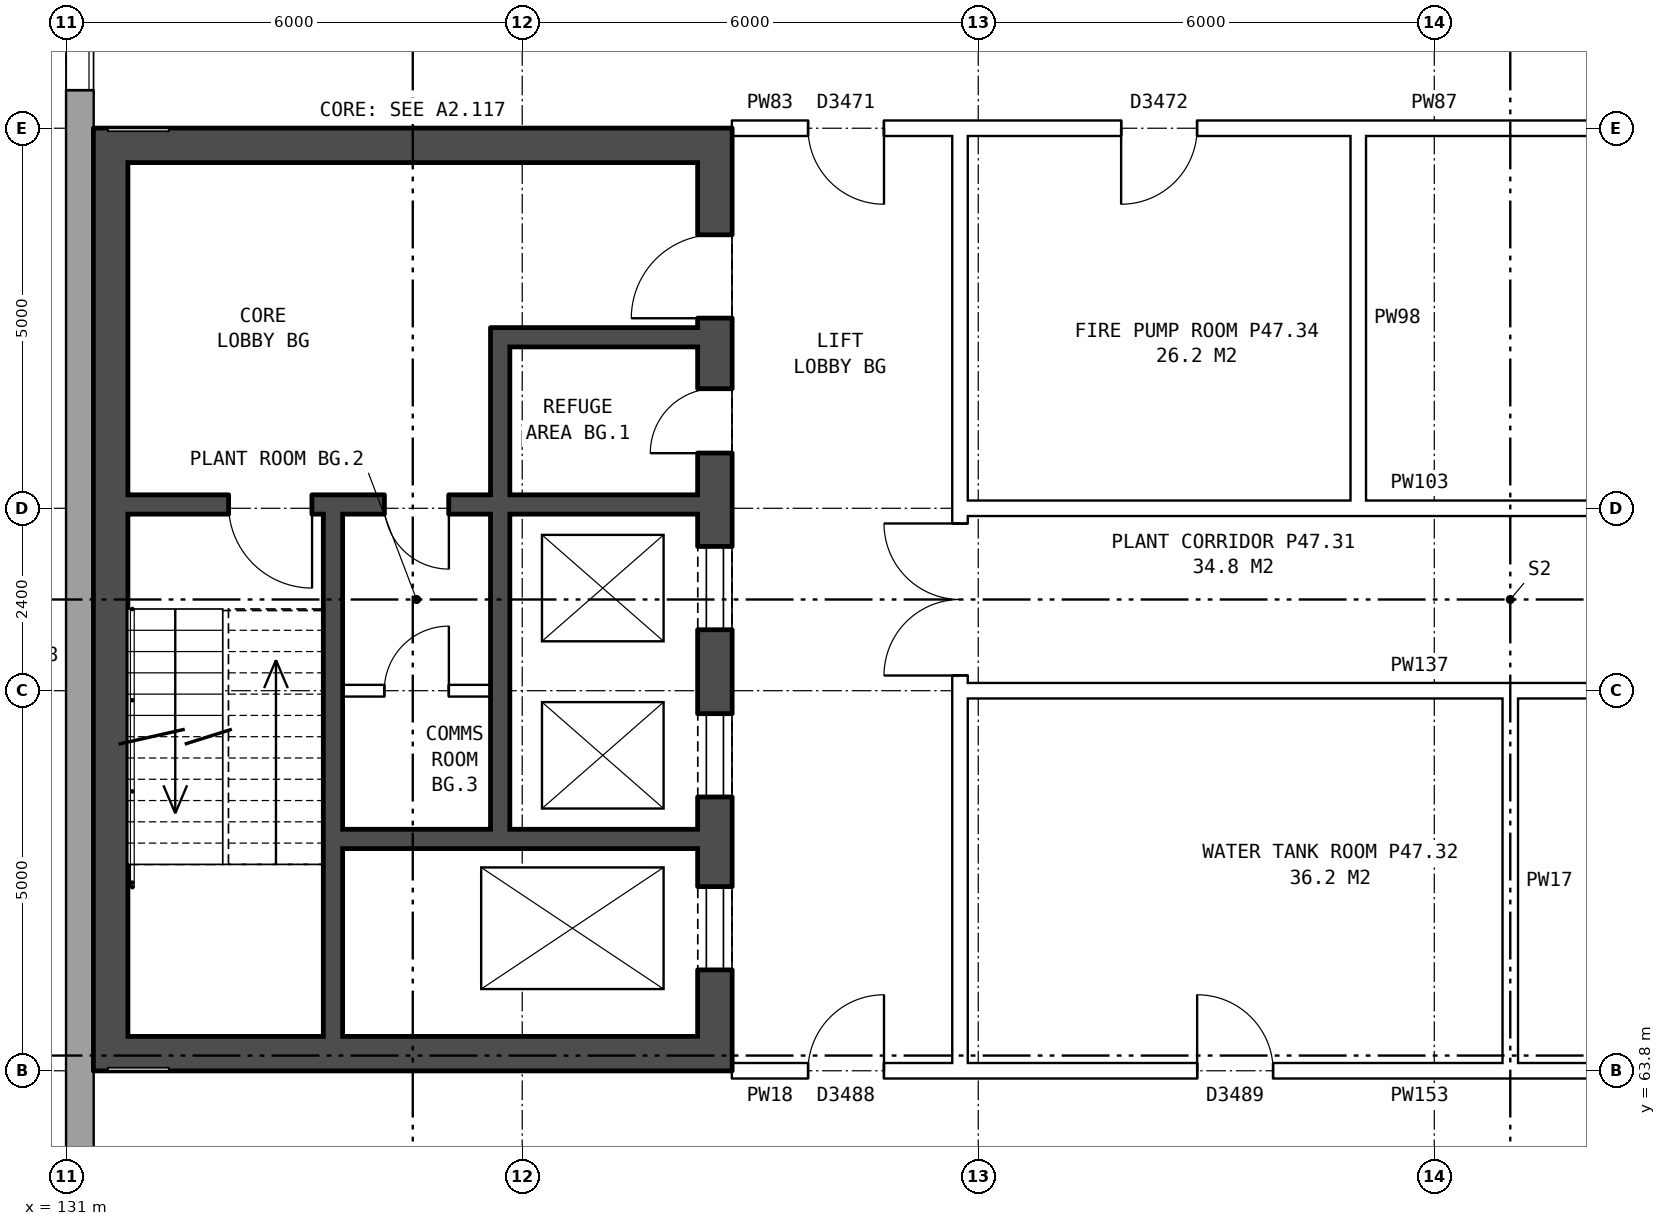
"""IFC4 building model, lengths in metres.
Left out: names, types, materials, properties, quantities, classifications, styles, units other than length and angle.
Written with IfcOpenShell. Run it as: python <this file> out.ifc"""

import sys

from ifc_helpers import new_model, si_unit, direction, frame, frame_2d, origin, place, context, subcontext, project, spatial, rectangle, extrude, element, fill, save


model = new_model("IFC4")
c1 = context("Model", 3, precision=1e-05, world=origin(), true_north=direction((0.0, 1.0)))
c2 = subcontext(c1, "Body", "Model", "MODEL_VIEW")
j1 = project(units=[si_unit("LENGTHUNIT", "METRE"), si_unit("PLANEANGLEUNIT", "RADIAN")], contexts=[c1])
p1 = place(None, origin())
s1 = spatial("IfcSite", under=j1, at=p1, CompositionType="ELEMENT")
p2 = place(p1, origin())
s2 = spatial("IfcBuilding", under=s1, at=p2, CompositionType="ELEMENT")
p3 = place(p2, frame((0.0, 0.0, 167.1)))
s3 = spatial("IfcBuildingStorey", under=s2, at=p3, CompositionType="ELEMENT", Elevation=167.1)
p4 = place(p3, frame((131.18, 82.925, 0.0), z_axis=(0.0, 0.0, 1.0), x_axis=(0.0, -1.0, 0.0)))
e1 = element("IfcWall", 1, at=p4, inside=s3, PredefinedType="STANDARD", context=c2, shape_type="SweptSolid", body=[
    extrude(rectangle(XDim=25.851, YDim=0.36, at=frame_2d((12.925, 0.0))), origin(), (0.0, 0.0, 1.0), 4.2),
])
p5 = place(p4, frame((2.9, 0.0, 1.5)))
e2 = element("IfcOpeningElement", 2, at=p5, cuts=e1, PredefinedType="OPENING", context=c2, shape_type="SweptSolid", body=[
    extrude(rectangle(XDim=0.6, YDim=1.2, at=frame_2d((0.3, 0.6))), frame((0.0, 0.19, 0.0), z_axis=(0.0, -1.0, 0.0), x_axis=(1.0, 0.0, 0.0)), (0.0, 0.0, 1.0), 0.38),
])
p6 = place(p4, frame((4.625, 0.0, 1.5)))
e3 = element("IfcOpeningElement", 3, at=p6, cuts=e1, PredefinedType="OPENING", context=c2, shape_type="SweptSolid", body=[
    extrude(rectangle(XDim=1.6, YDim=1.2, at=frame_2d((0.8, 0.6))), frame((0.0, 0.19, 0.0), z_axis=(0.0, -1.0, 0.0), x_axis=(1.0, 0.0, 0.0)), (0.0, 0.0, 1.0), 0.38),
])
p7 = place(p4, frame((21.1, 0.0, 1.5)))
e4 = element("IfcOpeningElement", 4, at=p7, cuts=e1, PredefinedType="OPENING", context=c2, shape_type="SweptSolid", body=[
    extrude(rectangle(XDim=0.6, YDim=1.2, at=frame_2d((0.3, 0.6))), frame((0.0, 0.19, 0.0), z_axis=(0.0, -1.0, 0.0), x_axis=(1.0, 0.0, 0.0)), (0.0, 0.0, 1.0), 0.38),
])
p8 = place(p4, frame((22.325, 0.0, 1.5)))
e5 = element("IfcOpeningElement", 5, at=p8, cuts=e1, PredefinedType="OPENING", context=c2, shape_type="SweptSolid", body=[
    extrude(rectangle(XDim=0.6, YDim=1.2, at=frame_2d((0.3, 0.6))), frame((0.0, 0.19, 0.0), z_axis=(0.0, -1.0, 0.0), x_axis=(1.0, 0.0, 0.0)), (0.0, 0.0, 1.0), 0.38),
])
p9 = place(p3, frame((139.535, 63.8, 0.0), z_axis=(0.0, 0.0, 1.0), x_axis=(0.0, 1.0, 0.0)))
e6 = element("IfcWall", 6, at=p9, inside=s3, PredefinedType="SHEAR", context=c2, shape_type="SweptSolid", body=[
    extrude(rectangle(XDim=12.4, YDim=0.45, at=frame_2d((6.2, 0.0))), origin(), (0.0, 0.0, 1.0), 4.2),
])
p10 = place(p9, frame((1.325, 0.0, 0.0)))
e7 = element("IfcOpeningElement", 7, at=p10, cuts=e6, PredefinedType="OPENING", context=c2, shape_type="SweptSolid", body=[
    extrude(rectangle(XDim=1.1, YDim=2.1, at=frame_2d((0.55, 1.05))), frame((0.0, 0.235, 0.0), z_axis=(0.0, -1.0, 0.0), x_axis=(1.0, 0.0, 0.0)), (0.0, 0.0, 1.0), 0.47),
])
p11 = place(p9, frame((3.6, 0.0, 0.0)))
e8 = element("IfcOpeningElement", 8, at=p11, cuts=e6, PredefinedType="OPENING", context=c2, shape_type="SweptSolid", body=[
    extrude(rectangle(XDim=1.1, YDim=2.1, at=frame_2d((0.55, 1.05))), frame((0.0, 0.235, 0.0), z_axis=(0.0, -1.0, 0.0), x_axis=(1.0, 0.0, 0.0)), (0.0, 0.0, 1.0), 0.47),
])
p12 = place(p9, frame((5.8, 0.0, 0.0)))
e9 = element("IfcOpeningElement", 9, at=p12, cuts=e6, PredefinedType="OPENING", context=c2, shape_type="SweptSolid", body=[
    extrude(rectangle(XDim=1.1, YDim=2.1, at=frame_2d((0.55, 1.05))), frame((0.0, 0.235, 0.0), z_axis=(0.0, -1.0, 0.0), x_axis=(1.0, 0.0, 0.0)), (0.0, 0.0, 1.0), 0.47),
])
p13 = place(p9, frame((9.9, 0.0, 0.0)))
e10 = element("IfcOpeningElement", 10, at=p13, cuts=e6, PredefinedType="OPENING", context=c2, shape_type="SweptSolid", body=[
    extrude(rectangle(XDim=1.1, YDim=2.1, at=frame_2d((0.55, 1.05))), frame((0.0, 0.235, 0.0), z_axis=(0.0, -1.0, 0.0), x_axis=(1.0, 0.0, 0.0)), (0.0, 0.0, 1.0), 0.47),
])
p14 = place(p9, frame((8.125, 0.0, 0.0)))
e11 = element("IfcOpeningElement", 11, at=p14, cuts=e6, PredefinedType="OPENING", context=c2, shape_type="SweptSolid", body=[
    extrude(rectangle(XDim=0.85, YDim=2.1, at=frame_2d((0.425, 1.05))), frame((0.0, 0.235, 0.0), z_axis=(0.0, -1.0, 0.0), x_axis=(1.0, 0.0, 0.0)), (0.0, 0.0, 1.0), 0.47),
])
p15 = place(p3, frame((131.585, 63.8, 0.0), z_axis=(0.0, 0.0, 1.0), x_axis=(0.0, 1.0, 0.0)))
e12 = element("IfcWall", 12, at=p15, inside=s3, PredefinedType="SHEAR", context=c2, shape_type="SweptSolid", body=[
    extrude(rectangle(XDim=12.4, YDim=0.45, at=frame_2d((6.2, 0.0))), origin(), (0.0, 0.0, 1.0), 4.2),
])
for number, where, z_axis, x_axis in (
    (13, (139.31, 64.025, 0.0), (0.0, 0.0, 1.0), (-1.0, 0.0, 0.0)),
    (14, (139.31, 75.975, 0.0), (0.0, 0.0, 1.0), (-1.0, 0.0, 0.0)),
):
    element("IfcWall", number, at=place(p3, frame(where, z_axis=z_axis, x_axis=x_axis)), inside=s3, PredefinedType="SHEAR", context=c2, shape_type="SweptSolid", body=[
        extrude(rectangle(XDim=7.5, YDim=0.45, at=frame_2d((3.75, 0.0))), origin(), (0.0, 0.0, 1.0), 4.2),
    ])
p16 = place(p3, frame((139.31, 66.85, 0.0), z_axis=(0.0, 0.0, 1.0), x_axis=(-1.0, 0.0, 0.0)))
e15 = element("IfcWall", 15, at=p16, inside=s3, PredefinedType="SHEAR", context=c2, shape_type="SweptSolid", body=[
    extrude(rectangle(XDim=4.675, YDim=0.25, at=frame_2d((2.337, 0.0))), origin(), (0.0, 0.0, 1.0), 4.2),
])
p17 = place(p3, frame((136.585, 68.8, 0.0), z_axis=(0.0, 0.0, 1.0), x_axis=(-1.0, 0.0, 0.0)))
e16 = element("IfcWall", 16, at=p17, inside=s3, PredefinedType="PARTITIONING", context=c2, shape_type="SweptSolid", body=[
    extrude(rectangle(XDim=1.95, YDim=0.15, at=frame_2d((0.975, 0.0))), origin(), (0.0, 0.0, 1.0), 4.2),
])
p18 = place(p17, frame((0.55, 0.0, 0.0)))
e17 = element("IfcOpeningElement", 17, at=p18, cuts=e16, PredefinedType="OPENING", context=c2, shape_type="SweptSolid", body=[
    extrude(rectangle(XDim=0.85, YDim=2.1, at=frame_2d((0.425, 1.05))), frame((0.0, 0.085, 0.0), z_axis=(0.0, -1.0, 0.0), x_axis=(1.0, 0.0, 0.0)), (0.0, 0.0, 1.0), 0.17),
])
p19 = place(p3, frame((139.31, 71.25, 0.0), z_axis=(0.0, 0.0, 1.0), x_axis=(-1.0, 0.0, 0.0)))
e18 = element("IfcWall", 18, at=p19, inside=s3, PredefinedType="SHEAR", context=c2, shape_type="SweptSolid", body=[
    extrude(rectangle(XDim=7.5, YDim=0.25, at=frame_2d((3.75, 0.0))), origin(), (0.0, 0.0, 1.0), 4.2),
])
p20 = place(p19, frame((5.075, 0.0, 0.0)))
e19 = element("IfcOpeningElement", 19, at=p20, cuts=e18, PredefinedType="OPENING", context=c2, shape_type="SweptSolid", body=[
    extrude(rectangle(XDim=1.1, YDim=2.1, at=frame_2d((0.55, 1.05))), frame((0.0, 0.135, 0.0), z_axis=(0.0, -1.0, 0.0), x_axis=(1.0, 0.0, 0.0)), (0.0, 0.0, 1.0), 0.27),
])
p21 = place(p19, frame((3.275, 0.0, 0.0)))
e20 = element("IfcOpeningElement", 20, at=p21, cuts=e18, PredefinedType="OPENING", context=c2, shape_type="SweptSolid", body=[
    extrude(rectangle(XDim=0.85, YDim=2.1, at=frame_2d((0.425, 1.05))), frame((0.0, 0.135, 0.0), z_axis=(0.0, -1.0, 0.0), x_axis=(1.0, 0.0, 0.0)), (0.0, 0.0, 1.0), 0.27),
])
p22 = place(p3, frame((139.31, 73.45, 0.0), z_axis=(0.0, 0.0, 1.0), x_axis=(-1.0, 0.0, 0.0)))
e21 = element("IfcWall", 21, at=p22, inside=s3, PredefinedType="SHEAR", context=c2, shape_type="SweptSolid", body=[
    extrude(rectangle(XDim=2.475, YDim=0.25, at=frame_2d((1.238, 0.0))), origin(), (0.0, 0.0, 1.0), 4.2),
])
p23 = place(p3, frame((136.71, 66.975, 0.0), z_axis=(0.0, 0.0, 1.0), x_axis=(0.0, 1.0, 0.0)))
e22 = element("IfcWall", 22, at=p23, inside=s3, PredefinedType="SHEAR", context=c2, shape_type="SweptSolid", body=[
    extrude(rectangle(XDim=4.15, YDim=0.25, at=frame_2d((2.075, 0.0))), origin(), (0.0, 0.0, 1.0), 4.2),
])
p24 = place(p3, frame((136.71, 71.375, 0.0), z_axis=(0.0, 0.0, 1.0), x_axis=(0.0, 1.0, 0.0)))
e23 = element("IfcWall", 23, at=p24, inside=s3, PredefinedType="SHEAR", context=c2, shape_type="SweptSolid", body=[
    extrude(rectangle(XDim=2.2, YDim=0.25, at=frame_2d((1.1, 0.0))), origin(), (0.0, 0.0, 1.0), 4.2),
])
p25 = place(p3, frame((134.51, 64.25, 0.0), z_axis=(0.0, 0.0, 1.0), x_axis=(0.0, 1.0, 0.0)))
e24 = element("IfcWall", 24, at=p25, inside=s3, PredefinedType="SHEAR", context=c2, shape_type="SweptSolid", body=[
    extrude(rectangle(XDim=6.875, YDim=0.25, at=frame_2d((3.438, 0.0))), origin(), (0.0, 0.0, 1.0), 4.2),
])
p26 = place(p3, frame((142.76, 63.9, 0.0), z_axis=(0.0, 0.0, 1.0), x_axis=(0.0, 1.0, 0.0)))
e25 = element("IfcWall", 25, at=p26, inside=s3, PredefinedType="PARTITIONING", context=c2, shape_type="SweptSolid", body=[
    extrude(rectangle(XDim=12.2, YDim=0.2, at=frame_2d((6.1, 0.0))), origin(), (0.0, 0.0, 1.0), 4.2),
])
p27 = place(p26, frame((5.1, 0.0, 0.0)))
e26 = element("IfcOpeningElement", 26, at=p27, cuts=e25, PredefinedType="OPENING", context=c2, shape_type="SweptSolid", body=[
    extrude(rectangle(XDim=2.0, YDim=2.1, at=frame_2d((1.0, 1.05))), frame((0.0, 0.11, 0.0), z_axis=(0.0, -1.0, 0.0), x_axis=(1.0, 0.0, 0.0)), (0.0, 0.0, 1.0), 0.22),
])
p28 = place(p3, frame((142.76, 63.8, 0.0), z_axis=(0.0, 0.0, 1.0), x_axis=(1.0, 0.0, 0.0)))
e27 = element("IfcWall", 27, at=p28, inside=s3, PredefinedType="PARTITIONING", context=c2, shape_type="SweptSolid", body=[
    extrude(rectangle(XDim=14.48, YDim=0.2, at=frame_2d((7.24, 0.0))), origin(), (0.0, 0.0, 1.0), 4.2),
])
p29 = place(p28, frame((3.12, 0.0, 0.0)))
e28 = element("IfcOpeningElement", 28, at=p29, cuts=e27, PredefinedType="OPENING", context=c2, shape_type="SweptSolid", body=[
    extrude(rectangle(XDim=1.0, YDim=2.1, at=frame_2d((0.5, 1.05))), frame((0.0, 0.11, 0.0), z_axis=(0.0, -1.0, 0.0), x_axis=(1.0, 0.0, 0.0)), (0.0, 0.0, 1.0), 0.22),
])
p30 = place(p28, frame((10.36, 0.0, 0.0)))
e29 = element("IfcOpeningElement", 29, at=p30, cuts=e27, PredefinedType="OPENING", context=c2, shape_type="SweptSolid", body=[
    extrude(rectangle(XDim=1.0, YDim=2.1, at=frame_2d((0.5, 1.05))), frame((0.0, 0.11, 0.0), z_axis=(0.0, -1.0, 0.0), x_axis=(1.0, 0.0, 0.0)), (0.0, 0.0, 1.0), 0.22),
])
p31 = place(p3, frame((139.76, 63.8, 0.0), z_axis=(0.0, 0.0, 1.0), x_axis=(1.0, 0.0, 0.0)))
e30 = element("IfcWall", 30, at=p31, inside=s3, PredefinedType="PARTITIONING", context=c2, shape_type="SweptSolid", body=[
    extrude(rectangle(XDim=3.0, YDim=0.2, at=frame_2d((1.5, 0.0))), origin(), (0.0, 0.0, 1.0), 4.2),
])
p32 = place(p31, frame((1.0, 0.0, 0.0)))
e31 = element("IfcOpeningElement", 31, at=p32, cuts=e30, PredefinedType="OPENING", context=c2, shape_type="SweptSolid", body=[
    extrude(rectangle(XDim=1.0, YDim=2.1, at=frame_2d((0.5, 1.05))), frame((0.0, 0.11, 0.0), z_axis=(0.0, -1.0, 0.0), x_axis=(1.0, 0.0, 0.0)), (0.0, 0.0, 1.0), 0.22),
])
for number, where, z_axis, x_axis in (
    (32, (142.76, 68.8, 0.0), (0.0, 0.0, 1.0), (1.0, 0.0, 0.0)),
    (33, (142.76, 71.2, 0.0), (0.0, 0.0, 1.0), (1.0, 0.0, 0.0)),
):
    element("IfcWall", number, at=place(p3, frame(where, z_axis=z_axis, x_axis=x_axis)), inside=s3, PredefinedType="PARTITIONING", context=c2, shape_type="SweptSolid", body=[
        extrude(rectangle(XDim=14.48, YDim=0.2, at=frame_2d((7.24, 0.0))), origin(), (0.0, 0.0, 1.0), 4.2),
    ])
p33 = place(p3, frame((142.76, 76.2, 0.0), z_axis=(0.0, 0.0, 1.0), x_axis=(1.0, 0.0, 0.0)))
e34 = element("IfcWall", 34, at=p33, inside=s3, PredefinedType="PARTITIONING", context=c2, shape_type="SweptSolid", body=[
    extrude(rectangle(XDim=14.48, YDim=0.2, at=frame_2d((7.24, 0.0))), origin(), (0.0, 0.0, 1.0), 4.2),
])
p34 = place(p33, frame((2.12, 0.0, 0.0)))
e35 = element("IfcOpeningElement", 35, at=p34, cuts=e34, PredefinedType="OPENING", context=c2, shape_type="SweptSolid", body=[
    extrude(rectangle(XDim=1.0, YDim=2.1, at=frame_2d((0.5, 1.05))), frame((0.0, 0.11, 0.0), z_axis=(0.0, -1.0, 0.0), x_axis=(1.0, 0.0, 0.0)), (0.0, 0.0, 1.0), 0.22),
])
p35 = place(p33, frame((9.36, 0.0, 0.0)))
e36 = element("IfcOpeningElement", 36, at=p35, cuts=e34, PredefinedType="OPENING", context=c2, shape_type="SweptSolid", body=[
    extrude(rectangle(XDim=1.0, YDim=2.1, at=frame_2d((0.5, 1.05))), frame((0.0, 0.11, 0.0), z_axis=(0.0, -1.0, 0.0), x_axis=(1.0, 0.0, 0.0)), (0.0, 0.0, 1.0), 0.22),
])
p36 = place(p3, frame((139.76, 76.2, 0.0), z_axis=(0.0, 0.0, 1.0), x_axis=(1.0, 0.0, 0.0)))
e37 = element("IfcWall", 37, at=p36, inside=s3, PredefinedType="PARTITIONING", context=c2, shape_type="SweptSolid", body=[
    extrude(rectangle(XDim=3.0, YDim=0.2, at=frame_2d((1.5, 0.0))), origin(), (0.0, 0.0, 1.0), 4.2),
])
p37 = place(p36, frame((1.0, 0.0, 0.0)))
e38 = element("IfcOpeningElement", 38, at=p37, cuts=e37, PredefinedType="OPENING", context=c2, shape_type="SweptSolid", body=[
    extrude(rectangle(XDim=1.0, YDim=2.1, at=frame_2d((0.5, 1.05))), frame((0.0, 0.11, 0.0), z_axis=(0.0, -1.0, 0.0), x_axis=(1.0, 0.0, 0.0)), (0.0, 0.0, 1.0), 0.22),
])
for number, where, z_axis, x_axis in (
    (39, (148.0, 71.1, 0.0), (0.0, 0.0, 1.0), (0.0, 1.0, 0.0)),
    (40, (150.0, 63.7, 0.0), (0.0, 0.0, 1.0), (0.0, 1.0, 0.0)),
):
    element("IfcWall", number, at=place(p3, frame(where, z_axis=z_axis, x_axis=x_axis)), inside=s3, PredefinedType="PARTITIONING", context=c2, shape_type="SweptSolid", body=[
        extrude(rectangle(XDim=5.2, YDim=0.2, at=frame_2d((2.6, 0.0))), origin(), (0.0, 0.0, 1.0), 4.2),
    ])
p38 = place(p6, origin())
e41 = element("IfcWindow", 41, at=p38, inside=s3, PartitioningType="DOUBLE_PANEL_HORIZONTAL", PredefinedType="WINDOW", context=c2, shape_type="SweptSolid", body=[
    extrude(rectangle(XDim=1.6, YDim=1.2, at=frame_2d((0.8, 0.6))), frame((0.0, 0.15, 0.0), z_axis=(0.0, -1.0, 0.0), x_axis=(1.0, 0.0, 0.0)), (0.0, 0.0, 1.0), 0.06),
])
fill(e3, e41)
p39 = place(p10, origin())
e42 = element("IfcDoor", 42, at=p39, inside=s3, OperationType="DOUBLE_DOOR_SLIDING", PredefinedType="DOOR", context=c2, shape_type="SweptSolid", body=[
    extrude(rectangle(XDim=1.1, YDim=2.1, at=frame_2d((0.55, 1.05))), frame((0.0, 0.21, 0.0), z_axis=(0.0, -1.0, 0.0), x_axis=(1.0, 0.0, 0.0)), (0.0, 0.0, 1.0), 0.05),
])
fill(e7, e42)
p40 = place(p11, origin())
e43 = element("IfcDoor", 43, at=p40, inside=s3, OperationType="DOUBLE_DOOR_SLIDING", PredefinedType="DOOR", context=c2, shape_type="SweptSolid", body=[
    extrude(rectangle(XDim=1.1, YDim=2.1, at=frame_2d((0.55, 1.05))), frame((0.0, 0.21, 0.0), z_axis=(0.0, -1.0, 0.0), x_axis=(1.0, 0.0, 0.0)), (0.0, 0.0, 1.0), 0.05),
])
fill(e8, e43)
p41 = place(p12, origin())
e44 = element("IfcDoor", 44, at=p41, inside=s3, OperationType="DOUBLE_DOOR_SLIDING", PredefinedType="DOOR", context=c2, shape_type="SweptSolid", body=[
    extrude(rectangle(XDim=1.1, YDim=2.1, at=frame_2d((0.55, 1.05))), frame((0.0, 0.21, 0.0), z_axis=(0.0, -1.0, 0.0), x_axis=(1.0, 0.0, 0.0)), (0.0, 0.0, 1.0), 0.05),
])
fill(e9, e44)
p42 = place(p13, origin())
e45 = element("IfcDoor", 45, at=p42, inside=s3, OperationType="SINGLE_SWING_LEFT", PredefinedType="DOOR", context=c2, shape_type="SweptSolid", body=[
    extrude(rectangle(XDim=1.1, YDim=2.1, at=frame_2d((0.55, 1.05))), frame((0.0, 0.21, 0.0), z_axis=(0.0, -1.0, 0.0), x_axis=(1.0, 0.0, 0.0)), (0.0, 0.0, 1.0), 0.05),
])
fill(e10, e45)
p43 = place(p20, origin())
e46 = element("IfcDoor", 46, at=p43, inside=s3, OperationType="SINGLE_SWING_LEFT", PredefinedType="DOOR", context=c2, shape_type="SweptSolid", body=[
    extrude(rectangle(XDim=1.1, YDim=2.1, at=frame_2d((0.55, 1.05))), frame((0.0, 0.025, 0.0), z_axis=(0.0, -1.0, 0.0), x_axis=(1.0, 0.0, 0.0)), (0.0, 0.0, 1.0), 0.05),
])
fill(e19, e46)
p44 = place(p14, origin())
e47 = element("IfcDoor", 47, at=p44, inside=s3, OperationType="SINGLE_SWING_LEFT", PredefinedType="DOOR", context=c2, shape_type="SweptSolid", body=[
    extrude(rectangle(XDim=0.85, YDim=2.1, at=frame_2d((0.425, 1.05))), frame((0.0, 0.21, 0.0), z_axis=(0.0, -1.0, 0.0), x_axis=(1.0, 0.0, 0.0)), (0.0, 0.0, 1.0), 0.05),
])
fill(e11, e47)
p45 = place(p21, origin())
e48 = element("IfcDoor", 48, at=p45, inside=s3, OperationType="SINGLE_SWING_LEFT", PredefinedType="DOOR", context=c2, shape_type="SweptSolid", body=[
    extrude(rectangle(XDim=0.85, YDim=2.1, at=frame_2d((0.425, 1.05))), frame((0.0, 0.025, 0.0), z_axis=(0.0, -1.0, 0.0), x_axis=(1.0, 0.0, 0.0)), (0.0, 0.0, 1.0), 0.05),
])
fill(e20, e48)
p46 = place(p18, frame((0.85, 0.0, 0.0), z_axis=(0.0, 0.0, 1.0), x_axis=(-1.0, 0.0, 0.0)))
e49 = element("IfcDoor", 49, at=p46, inside=s3, OperationType="SINGLE_SWING_RIGHT", PredefinedType="DOOR", context=c2, shape_type="SweptSolid", body=[
    extrude(rectangle(XDim=0.85, YDim=2.1, at=frame_2d((0.425, 1.05))), frame((0.0, 0.025, 0.0), z_axis=(0.0, -1.0, 0.0), x_axis=(1.0, 0.0, 0.0)), (0.0, 0.0, 1.0), 0.05),
])
fill(e17, e49)
p47 = place(p27, origin())
e50 = element("IfcDoor", 50, at=p47, inside=s3, OperationType="DOUBLE_DOOR_SINGLE_SWING", PredefinedType="DOOR", context=c2, shape_type="SweptSolid", body=[
    extrude(rectangle(XDim=2.0, YDim=2.1, at=frame_2d((1.0, 1.05))), frame((0.0, 0.025, 0.0), z_axis=(0.0, -1.0, 0.0), x_axis=(1.0, 0.0, 0.0)), (0.0, 0.0, 1.0), 0.05),
])
fill(e26, e50)
p48 = place(p29, origin())
e51 = element("IfcDoor", 51, at=p48, inside=s3, OperationType="SINGLE_SWING_LEFT", PredefinedType="DOOR", context=c2, shape_type="SweptSolid", body=[
    extrude(rectangle(XDim=1.0, YDim=2.1, at=frame_2d((0.5, 1.05))), frame((0.0, 0.025, 0.0), z_axis=(0.0, -1.0, 0.0), x_axis=(1.0, 0.0, 0.0)), (0.0, 0.0, 1.0), 0.05),
])
fill(e28, e51)
p49 = place(p32, origin())
e52 = element("IfcDoor", 52, at=p49, inside=s3, OperationType="SINGLE_SWING_RIGHT", PredefinedType="DOOR", context=c2, shape_type="SweptSolid", body=[
    extrude(rectangle(XDim=1.0, YDim=2.1, at=frame_2d((0.5, 1.05))), frame((0.0, 0.025, 0.0), z_axis=(0.0, -1.0, 0.0), x_axis=(1.0, 0.0, 0.0)), (0.0, 0.0, 1.0), 0.05),
])
fill(e31, e52)
p50 = place(p34, frame((1.0, 0.0, 0.0), z_axis=(0.0, 0.0, 1.0), x_axis=(-1.0, 0.0, 0.0)))
e53 = element("IfcDoor", 53, at=p50, inside=s3, OperationType="SINGLE_SWING_RIGHT", PredefinedType="DOOR", context=c2, shape_type="SweptSolid", body=[
    extrude(rectangle(XDim=1.0, YDim=2.1, at=frame_2d((0.5, 1.05))), frame((0.0, 0.025, 0.0), z_axis=(0.0, -1.0, 0.0), x_axis=(1.0, 0.0, 0.0)), (0.0, 0.0, 1.0), 0.05),
])
fill(e35, e53)
p51 = place(p37, frame((1.0, 0.0, 0.0), z_axis=(0.0, 0.0, 1.0), x_axis=(-1.0, 0.0, 0.0)))
e54 = element("IfcDoor", 54, at=p51, inside=s3, OperationType="SINGLE_SWING_LEFT", PredefinedType="DOOR", context=c2, shape_type="SweptSolid", body=[
    extrude(rectangle(XDim=1.0, YDim=2.1, at=frame_2d((0.5, 1.05))), frame((0.0, 0.025, 0.0), z_axis=(0.0, -1.0, 0.0), x_axis=(1.0, 0.0, 0.0)), (0.0, 0.0, 1.0), 0.05),
])
fill(e38, e54)
save(model, sys.argv[1])
